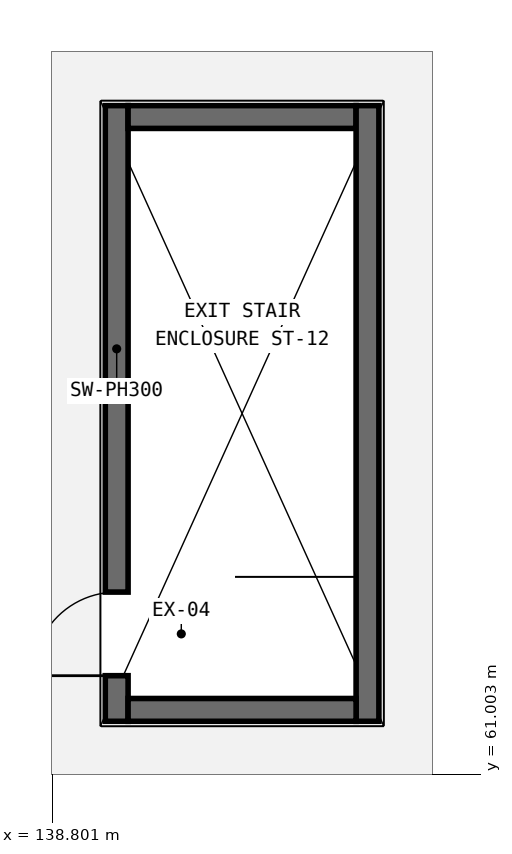
"""IFC4 building model, lengths in metres.
Left out: names, types, materials, properties, quantities, classifications, styles, units other than length and angle.
Written with IfcOpenShell. Run it as: python <this file> out.ifc"""

import sys

from ifc_helpers import new_model, si_unit, direction, frame, frame_2d, origin, place, context, subcontext, project, spatial, rectangle, extrude, element, fill, save


model = new_model("IFC4")
c1 = context("Model", 3, precision=1e-05, world=origin(), true_north=direction((0.0, 1.0)))
c2 = subcontext(c1, "Body", "Model", "MODEL_VIEW")
j1 = project(units=[si_unit("LENGTHUNIT", "METRE"), si_unit("PLANEANGLEUNIT", "RADIAN")], contexts=[c1])
p1 = place(None, origin())
s1 = spatial("IfcSite", under=j1, at=p1, CompositionType="ELEMENT")
p2 = place(p1, origin())
s2 = spatial("IfcBuilding", under=s1, at=p2, CompositionType="ELEMENT")
p3 = place(p2, origin())
s3 = spatial("IfcBuildingStorey", under=s2, at=p3, CompositionType="ELEMENT", Elevation=0.0)
p4 = place(p3, frame((139.65, 61.7, 0.0), z_axis=(0.0, 0.0, 1.0), x_axis=(0.0, 1.0, 0.0)))
e1 = element("IfcWall", 1, at=p4, inside=s3, PredefinedType="SHEAR", context=c2, shape_type="SweptSolid", body=[
    extrude(rectangle(XDim=8.1, YDim=0.3, at=frame_2d((4.05, 0.0))), origin(), (0.0, 0.0, 1.0), 3.2),
])
p5 = place(p4, frame((0.6, 0.0, 0.0)))
e2 = element("IfcOpeningElement", 2, at=p5, cuts=e1, PredefinedType="OPENING", context=c2, shape_type="SweptSolid", body=[
    extrude(rectangle(XDim=1.1, YDim=2.15, at=frame_2d((0.55, 1.075))), frame((0.0, 0.16, 0.0), z_axis=(0.0, -1.0, 0.0), x_axis=(1.0, 0.0, 0.0)), (0.0, 0.0, 1.0), 0.32),
])
p6 = place(p3, frame((139.8, 69.65, 0.0), z_axis=(0.0, 0.0, 1.0), x_axis=(1.0, 0.0, 0.0)))
e3 = element("IfcWall", 3, at=p6, inside=s3, PredefinedType="SHEAR", context=c2, shape_type="SweptSolid", body=[
    extrude(rectangle(XDim=3.0, YDim=0.3, at=frame_2d((1.5, 0.0))), origin(), (0.0, 0.0, 1.0), 3.2),
])
p7 = place(p3, frame((142.95, 69.8, 0.0), z_axis=(0.0, 0.0, 1.0), x_axis=(0.0, -1.0, 0.0)))
e4 = element("IfcWall", 4, at=p7, inside=s3, PredefinedType="SHEAR", context=c2, shape_type="SweptSolid", body=[
    extrude(rectangle(XDim=8.1, YDim=0.3, at=frame_2d((4.05, 0.0))), origin(), (0.0, 0.0, 1.0), 3.2),
])
p8 = place(p3, frame((142.8, 61.85, 0.0), z_axis=(0.0, 0.0, 1.0), x_axis=(-1.0, 0.0, 0.0)))
e5 = element("IfcWall", 5, at=p8, inside=s3, PredefinedType="SHEAR", context=c2, shape_type="SweptSolid", body=[
    extrude(rectangle(XDim=3.0, YDim=0.3, at=frame_2d((1.5, 0.0))), origin(), (0.0, 0.0, 1.0), 3.2),
])
p9 = place(p5, origin())
e6 = element("IfcDoor", 6, at=p9, inside=s3, OperationType="SINGLE_SWING_LEFT", PredefinedType="DOOR", context=c2, shape_type="SweptSolid", body=[
    extrude(rectangle(XDim=1.1, YDim=2.15, at=frame_2d((0.55, 1.075))), frame((0.0, 0.025, 0.0), z_axis=(0.0, -1.0, 0.0), x_axis=(1.0, 0.0, 0.0)), (0.0, 0.0, 1.0), 0.05),
])
fill(e2, e6)
save(model, sys.argv[1])
